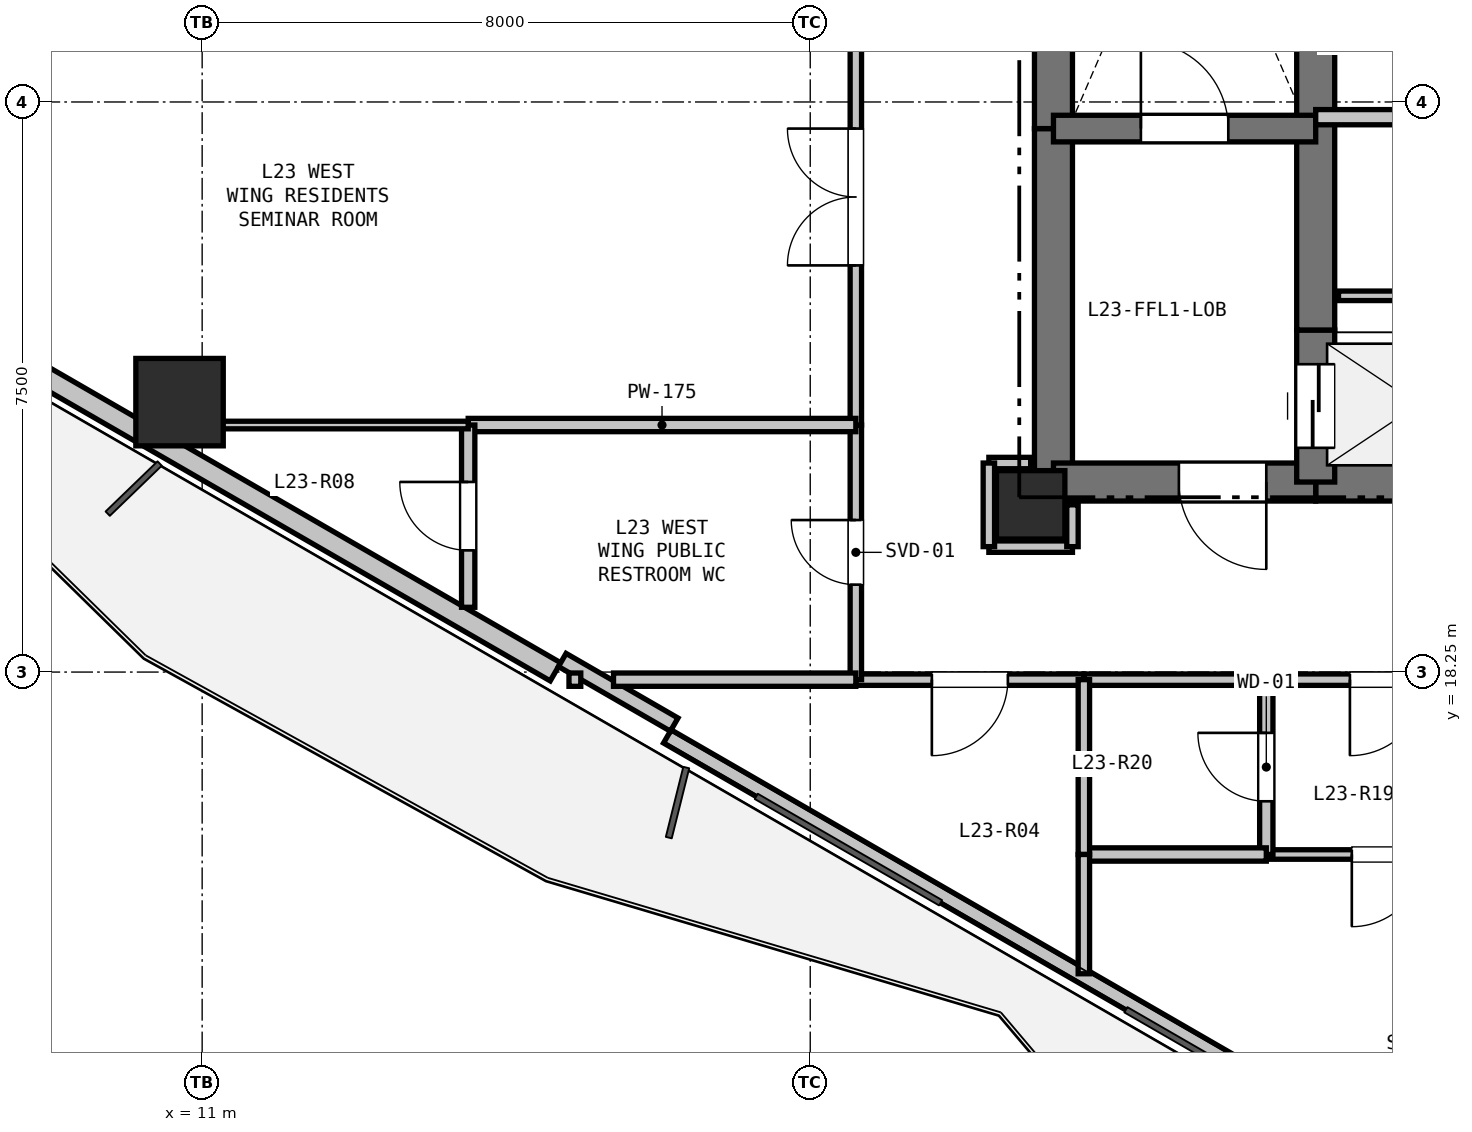
"""IFC4 building model, lengths in metres.
Left out: names, types, materials, properties, quantities, classifications, styles, units other than length and angle.
Written with IfcOpenShell. Run it as: python <this file> out.ifc"""

import sys

from ifc_helpers import new_model, si_unit, direction, frame, frame_2d, origin, origin_2d, place, context, subcontext, project, spatial, rectangle, hollow_rectangle, extrude, element, fill, save


model = new_model("IFC4")
c1 = context("Model", 3, precision=1e-05, world=origin(), true_north=direction((0.0, 1.0)))
c2 = subcontext(c1, "Body", "Model", "MODEL_VIEW")
j1 = project(units=[si_unit("LENGTHUNIT", "METRE"), si_unit("PLANEANGLEUNIT", "RADIAN")], contexts=[c1])
p1 = place(None, origin())
s1 = spatial("IfcSite", under=j1, at=p1, CompositionType="ELEMENT")
p2 = place(p1, origin())
s2 = spatial("IfcBuilding", under=s1, at=p2, CompositionType="ELEMENT")
p3 = place(p2, frame((0.0, 0.0, 86.7)))
s3 = spatial("IfcBuildingStorey", under=s2, at=p3, CompositionType="ELEMENT", Elevation=86.7)
p4 = place(p3, frame((21.9, 20.45, 0.0), z_axis=(0.0, 0.0, 1.0), x_axis=(1.0, 0.0, 0.0)))
e1 = element("IfcColumn", 1, at=p4, inside=s3, PredefinedType="COLUMN", context=c2, shape_type="SweptSolid", body=[
    extrude(rectangle(XDim=0.9, YDim=0.9, at=origin_2d()), origin(), (0.0, 0.0, 1.0), 3.3),
])
p5 = place(p3, frame((10.702, 21.801, 0.0), z_axis=(0.0, 0.0, 1.0), x_axis=(1.0, 0.0, 0.0)))
e2 = element("IfcColumn", 2, at=p5, inside=s3, PredefinedType="COLUMN", context=c2, shape_type="SweptSolid", body=[
    extrude(hollow_rectangle(XDim=1.15, YDim=1.15, WallThickness=0.032, at=origin_2d()), origin(), (0.0, 0.0, 1.0), 3.3),
])
p6 = place(p3, frame((26.845, 11.788, 0.0), z_axis=(0.0, 0.0, 1.0), x_axis=(-0.866027010039, 0.499997217876, 0.0)))
e3 = element("IfcWall", 3, at=p6, inside=s3, PredefinedType="PARAPET", context=c2, shape_type="SweptSolid", body=[
    extrude(rectangle(XDim=11.229, YDim=0.2, at=frame_2d((5.615, 0.0))), origin(), (0.0, 0.0, 1.0), 0.2),
])
p7 = place(p3, frame((15.648, 18.253, 0.0), z_axis=(0.0, 0.0, 1.0), x_axis=(-0.866023023012, 0.500004123596, 0.0)))
e4 = element("IfcWall", 4, at=p7, inside=s3, PredefinedType="SOLIDWALL", context=c2, shape_type="SweptSolid", body=[
    extrude(rectangle(XDim=11.93, YDim=0.275, at=frame_2d((5.965, 0.0))), origin(), (0.0, 0.0, 1.0), 2.67),
])
p8 = place(p7, frame((7.725, 0.0, 0.9)))
e5 = element("IfcOpeningElement", 5, at=p8, cuts=e4, PredefinedType="OPENING", context=c2, shape_type="SweptSolid", body=[
    extrude(rectangle(XDim=1.2, YDim=1.5, at=frame_2d((0.6, 0.75))), frame((0.0, 0.147, 0.0), z_axis=(0.0, -1.0, 0.0), x_axis=(1.0, 0.0, 0.0)), (0.0, 0.0, 1.0), 0.295),
])
p9 = place(p3, frame((17.21, 17.559, 0.0), z_axis=(0.0, 0.0, 1.0), x_axis=(-0.866025371046, 0.500000056704, 0.0)))
e6 = element("IfcWall", 6, at=p9, inside=s3, PredefinedType="PARAPET", context=c2, shape_type="SweptSolid", body=[
    extrude(rectangle(XDim=1.7, YDim=0.2, at=frame_2d((0.85, 0.0))), origin(), (0.0, 0.0, 1.0), 2.67),
])
p10 = place(p3, frame((22.2, 20.75, 0.0), z_axis=(0.0, 0.0, 1.0), x_axis=(0.0, 1.0, 0.0)))
e7 = element("IfcWall", 7, at=p10, inside=s3, PredefinedType="SHEAR", context=c2, shape_type="SweptSolid", body=[
    extrude(rectangle(XDim=4.65, YDim=0.5, at=frame_2d((2.325, 0.0))), origin(), (0.0, 0.0, 1.0), 3.05),
])
p11 = place(p3, frame((22.2, 25.4, 0.0), z_axis=(0.0, 0.0, 1.0), x_axis=(0.0, 1.0, 0.0)))
e8 = element("IfcWall", 8, at=p11, inside=s3, PredefinedType="SHEAR", context=c2, shape_type="SweptSolid", body=[
    extrude(rectangle(XDim=7.35, YDim=0.5, at=frame_2d((3.675, 0.0))), origin(), (0.0, 0.0, 1.0), 3.05),
])
p12 = place(p3, frame((28.35, 20.75, 0.0), z_axis=(0.0, 0.0, 1.0), x_axis=(-1.0, 0.0, 0.0)))
e9 = element("IfcWall", 9, at=p12, inside=s3, PredefinedType="SHEAR", context=c2, shape_type="SweptSolid", body=[
    extrude(rectangle(XDim=2.7, YDim=0.5, at=frame_2d((1.35, 0.0))), origin(), (0.0, 0.0, 1.0), 3.05),
])
p13 = place(p3, frame((25.65, 20.75, 0.0), z_axis=(0.0, 0.0, 1.0), x_axis=(-1.0, 0.0, 0.0)))
e10 = element("IfcWall", 10, at=p13, inside=s3, PredefinedType="SHEAR", context=c2, shape_type="SweptSolid", body=[
    extrude(rectangle(XDim=3.45, YDim=0.5, at=frame_2d((1.725, 0.0))), origin(), (0.0, 0.0, 1.0), 3.05),
])
p14 = place(p13, frame((0.65, 0.0, 0.0)))
e11 = element("IfcOpeningElement", 11, at=p14, cuts=e10, PredefinedType="OPENING", context=c2, shape_type="SweptSolid", body=[
    extrude(rectangle(XDim=1.15, YDim=2.15, at=frame_2d((0.575, 1.075))), frame((0.0, 0.26, 0.0), z_axis=(0.0, -1.0, 0.0), x_axis=(1.0, 0.0, 0.0)), (0.0, 0.0, 1.0), 0.52),
])
p15 = place(p3, frame((25.65, 20.75, 0.0), z_axis=(0.0, 0.0, 1.0), x_axis=(0.0, 1.0, 0.0)))
e12 = element("IfcWall", 12, at=p15, inside=s3, PredefinedType="SHEAR", context=c2, shape_type="SweptSolid", body=[
    extrude(rectangle(XDim=2.0, YDim=0.5, at=frame_2d((1.0, 0.0))), origin(), (0.0, 0.0, 1.0), 3.05),
])
p16 = place(p15, frame((0.45, 0.0, 0.0)))
e13 = element("IfcOpeningElement", 13, at=p16, cuts=e12, PredefinedType="OPENING", context=c2, shape_type="SweptSolid", body=[
    extrude(rectangle(XDim=1.1, YDim=2.15, at=frame_2d((0.55, 1.075))), frame((0.0, 0.26, 0.0), z_axis=(0.0, -1.0, 0.0), x_axis=(1.0, 0.0, 0.0)), (0.0, 0.0, 1.0), 0.52),
])
p17 = place(p3, frame((25.65, 22.75, 0.0), z_axis=(0.0, 0.0, 1.0), x_axis=(0.0, 1.0, 0.0)))
e14 = element("IfcWall", 14, at=p17, inside=s3, PredefinedType="SHEAR", context=c2, shape_type="SweptSolid", body=[
    extrude(rectangle(XDim=2.8, YDim=0.5, at=frame_2d((1.4, 0.0))), origin(), (0.0, 0.0, 1.0), 3.05),
])
p18 = place(p3, frame((25.65, 25.55, 0.0), z_axis=(0.0, 0.0, 1.0), x_axis=(0.0, 1.0, 0.0)))
e15 = element("IfcWall", 15, at=p18, inside=s3, PredefinedType="SHEAR", context=c2, shape_type="SweptSolid", body=[
    extrude(rectangle(XDim=2.4, YDim=0.5, at=frame_2d((1.2, 0.0))), origin(), (0.0, 0.0, 1.0), 3.05),
])
p19 = place(p3, frame((22.2, 25.4, 0.0), z_axis=(0.0, 0.0, 1.0), x_axis=(1.0, 0.0, 0.0)))
e16 = element("IfcWall", 16, at=p19, inside=s3, PredefinedType="SHEAR", context=c2, shape_type="SweptSolid", body=[
    extrude(rectangle(XDim=3.45, YDim=0.35, at=frame_2d((1.725, 0.0))), origin(), (0.0, 0.0, 1.0), 3.05),
])
p20 = place(p19, frame((1.15, 0.0, 0.0)))
e17 = element("IfcOpeningElement", 17, at=p20, cuts=e16, PredefinedType="OPENING", context=c2, shape_type="SweptSolid", body=[
    extrude(rectangle(XDim=1.15, YDim=2.15, at=frame_2d((0.575, 1.075))), frame((0.0, 0.185, 0.0), z_axis=(0.0, -1.0, 0.0), x_axis=(1.0, 0.0, 0.0)), (0.0, 0.0, 1.0), 0.37),
])
p21 = place(p3, frame((25.65, 25.55, 0.0), z_axis=(0.0, 0.0, 1.0), x_axis=(1.0, 0.0, 0.0)))
e18 = element("IfcWall", 18, at=p21, inside=s3, PredefinedType="PARTITIONING", context=c2, shape_type="SweptSolid", body=[
    extrude(rectangle(XDim=4.95, YDim=0.2, at=frame_2d((2.475, 0.0))), origin(), (0.0, 0.0, 1.0), 3.05),
])
p22 = place(p3, frame((25.95, 23.2, 0.0), z_axis=(0.0, 0.0, 1.0), x_axis=(1.0, 0.0, 0.0)))
e19 = element("IfcWall", 19, at=p22, inside=s3, PredefinedType="PARTITIONING", context=c2, shape_type="SweptSolid", body=[
    extrude(rectangle(XDim=1.35, YDim=0.125, at=frame_2d((0.675, 0.0))), origin(), (0.0, 0.0, 1.0), 3.05),
])
p23 = place(p3, frame((21.35, 19.9, 0.0), z_axis=(0.0, 0.0, 1.0), x_axis=(1.0, 0.0, 0.0)))
e20 = element("IfcWall", 20, at=p23, inside=s3, PredefinedType="PARTITIONING", context=c2, shape_type="SweptSolid", body=[
    extrude(rectangle(XDim=1.1, YDim=0.15, at=frame_2d((0.55, 0.0))), origin(), (0.0, 0.0, 1.0), 2.423),
])
p24 = place(p3, frame((22.45, 19.9, 0.0), z_axis=(0.0, 0.0, 1.0), x_axis=(0.0, 1.0, 0.0)))
e21 = element("IfcWall", 21, at=p24, inside=s3, PredefinedType="PARTITIONING", context=c2, shape_type="SweptSolid", body=[
    extrude(rectangle(XDim=0.55, YDim=0.15, at=frame_2d((0.275, 0.0))), origin(), (0.0, 0.0, 1.0), 2.423),
])
p25 = place(p3, frame((28.2, 18.15, 0.0), z_axis=(0.0, 0.0, 1.0), x_axis=(-1.0, 0.0, 0.0)))
e22 = element("IfcWall", 22, at=p25, inside=s3, PredefinedType="PARTITIONING", context=c2, shape_type="SweptSolid", body=[
    extrude(rectangle(XDim=3.2, YDim=0.15, at=frame_2d((1.6, 0.0))), origin(), (0.0, 0.0, 1.0), 3.05),
])
p26 = place(p25, frame((1.1, 0.0, 0.0)))
e23 = element("IfcOpeningElement", 23, at=p26, cuts=e22, PredefinedType="OPENING", context=c2, shape_type="SweptSolid", body=[
    extrude(rectangle(XDim=1.0, YDim=2.15, at=frame_2d((0.5, 1.075))), frame((0.0, 0.085, 0.0), z_axis=(0.0, -1.0, 0.0), x_axis=(1.0, 0.0, 0.0)), (0.0, 0.0, 1.0), 0.17),
])
p27 = place(p3, frame((25.0, 18.15, 0.0), z_axis=(0.0, 0.0, 1.0), x_axis=(-1.0, 0.0, 0.0)))
e24 = element("IfcWall", 24, at=p27, inside=s3, PredefinedType="PARTITIONING", context=c2, shape_type="SweptSolid", body=[
    extrude(rectangle(XDim=2.4, YDim=0.15, at=frame_2d((1.2, 0.0))), origin(), (0.0, 0.0, 1.0), 2.423),
])
p28 = place(p3, frame((22.6, 18.15, 0.0), z_axis=(0.0, 0.0, 1.0), x_axis=(-1.0, 0.0, 0.0)))
e25 = element("IfcWall", 25, at=p28, inside=s3, PredefinedType="PARTITIONING", context=c2, shape_type="SweptSolid", body=[
    extrude(rectangle(XDim=3.0, YDim=0.15, at=frame_2d((1.5, 0.0))), origin(), (0.0, 0.0, 1.0), 3.05),
])
p29 = place(p28, frame((1.0, 0.0, 0.0)))
e26 = element("IfcOpeningElement", 26, at=p29, cuts=e25, PredefinedType="OPENING", context=c2, shape_type="SweptSolid", body=[
    extrude(rectangle(XDim=1.0, YDim=2.15, at=frame_2d((0.5, 1.075))), frame((0.0, 0.085, 0.0), z_axis=(0.0, -1.0, 0.0), x_axis=(1.0, 0.0, 0.0)), (0.0, 0.0, 1.0), 0.17),
])
p30 = place(p3, frame((19.6, 18.15, 0.0), z_axis=(0.0, 0.0, 1.0), x_axis=(0.0, 1.0, 0.0)))
e27 = element("IfcWall", 27, at=p30, inside=s3, PredefinedType="PARTITIONING", context=c2, shape_type="SweptSolid", body=[
    extrude(rectangle(XDim=3.35, YDim=0.15, at=frame_2d((1.675, 0.0))), origin(), (0.0, 0.0, 1.0), 2.423),
])
p31 = place(p30, frame((1.25, 0.0, 0.0)))
e28 = element("IfcOpeningElement", 28, at=p31, cuts=e27, PredefinedType="OPENING", context=c2, shape_type="SweptSolid", body=[
    extrude(rectangle(XDim=0.85, YDim=2.1, at=frame_2d((0.425, 1.05))), frame((0.0, 0.085, 0.0), z_axis=(0.0, -1.0, 0.0), x_axis=(1.0, 0.0, 0.0)), (0.0, 0.0, 1.0), 0.17),
])
p32 = place(p3, frame((19.6, 21.5, 0.0), z_axis=(0.0, 0.0, 1.0), x_axis=(0.0, 1.0, 0.0)))
e29 = element("IfcWall", 29, at=p32, inside=s3, PredefinedType="PARTITIONING", context=c2, shape_type="SweptSolid", body=[
    extrude(rectangle(XDim=6.0, YDim=0.15, at=frame_2d((3.0, 0.0))), origin(), (0.0, 0.0, 1.0), 3.05),
])
p33 = place(p32, frame((2.1, 0.0, 0.0)))
e30 = element("IfcOpeningElement", 30, at=p33, cuts=e29, PredefinedType="OPENING", context=c2, shape_type="SweptSolid", body=[
    extrude(rectangle(XDim=1.8, YDim=2.2, at=frame_2d((0.9, 1.1))), frame((0.0, 0.085, 0.0), z_axis=(0.0, -1.0, 0.0), x_axis=(1.0, 0.0, 0.0)), (0.0, 0.0, 1.0), 0.17),
])
p34 = place(p3, frame((21.9, 21.0, 0.0), z_axis=(0.0, 0.0, 1.0), x_axis=(-1.0, 0.0, 0.0)))
e31 = element("IfcWall", 31, at=p34, inside=s3, PredefinedType="PARTITIONING", context=c2, shape_type="SweptSolid", body=[
    extrude(rectangle(XDim=0.55, YDim=0.15, at=frame_2d((0.275, 0.0))), origin(), (0.0, 0.0, 1.0), 2.498),
])
p35 = place(p3, frame((21.35, 21.0, 0.0), z_axis=(0.0, 0.0, 1.0), x_axis=(0.0, -1.0, 0.0)))
e32 = element("IfcWall", 32, at=p35, inside=s3, PredefinedType="PARTITIONING", context=c2, shape_type="SweptSolid", body=[
    extrude(rectangle(XDim=1.1, YDim=0.15, at=frame_2d((0.55, 0.0))), origin(), (0.0, 0.0, 1.0), 2.423),
])
p36 = place(p3, frame((28.2, 15.85, 0.0), z_axis=(0.0, 0.0, 1.0), x_axis=(-1.0, 0.0, 0.0)))
e33 = element("IfcWall", 33, at=p36, inside=s3, PredefinedType="PARTITIONING", context=c2, shape_type="SweptSolid", body=[
    extrude(rectangle(XDim=3.2, YDim=0.125, at=frame_2d((1.6, 0.0))), origin(), (0.0, 0.0, 1.0), 2.423),
])
p37 = place(p36, frame((1.125, 0.0, 0.0)))
e34 = element("IfcOpeningElement", 34, at=p37, cuts=e33, PredefinedType="OPENING", context=c2, shape_type="SweptSolid", body=[
    extrude(rectangle(XDim=0.95, YDim=2.1, at=frame_2d((0.475, 1.05))), frame((0.0, 0.073, 0.0), z_axis=(0.0, -1.0, 0.0), x_axis=(1.0, 0.0, 0.0)), (0.0, 0.0, 1.0), 0.145),
])
p38 = place(p3, frame((25.0, 15.85, 0.0), z_axis=(0.0, 0.0, 1.0), x_axis=(0.0, 1.0, 0.0)))
e35 = element("IfcWall", 35, at=p38, inside=s3, PredefinedType="PLUMBINGWALL", context=c2, shape_type="SweptSolid", body=[
    extrude(rectangle(XDim=2.3, YDim=0.175, at=frame_2d((1.15, 0.0))), origin(), (0.0, 0.0, 1.0), 2.423),
])
p39 = place(p38, frame((0.7, 0.0, 0.0)))
e36 = element("IfcOpeningElement", 36, at=p39, cuts=e35, PredefinedType="OPENING", context=c2, shape_type="SweptSolid", body=[
    extrude(rectangle(XDim=0.9, YDim=2.1, at=frame_2d((0.45, 1.05))), frame((0.0, 0.097, 0.0), z_axis=(0.0, -1.0, 0.0), x_axis=(1.0, 0.0, 0.0)), (0.0, 0.0, 1.0), 0.195),
])
p40 = place(p3, frame((14.5, 21.5, 0.0), z_axis=(0.0, 0.0, 1.0), x_axis=(1.0, 0.0, 0.0)))
e37 = element("IfcWall", 37, at=p40, inside=s3, PredefinedType="PLUMBINGWALL", context=c2, shape_type="SweptSolid", body=[
    extrude(rectangle(XDim=5.1, YDim=0.175, at=frame_2d((2.55, 0.0))), origin(), (0.0, 0.0, 1.0), 2.423),
])
p41 = place(p3, frame((19.6, 18.15, 0.0), z_axis=(0.0, 0.0, 1.0), x_axis=(-1.0, 0.0, 0.0)))
e38 = element("IfcWall", 38, at=p41, inside=s3, PredefinedType="PLUMBINGWALL", context=c2, shape_type="SweptSolid", body=[
    extrude(rectangle(XDim=3.188, YDim=0.175, at=frame_2d((1.594, 0.0))), origin(), (0.0, 0.0, 1.0), 2.365),
])
p42 = place(p3, frame((15.981, 18.15, 0.0), z_axis=(0.0, 0.0, 1.0), x_axis=(-1.0, 0.0, 0.0)))
e39 = element("IfcWall", 39, at=p42, inside=s3, PredefinedType="PLUMBINGWALL", context=c2, shape_type="SweptSolid", body=[
    extrude(rectangle(XDim=0.155, YDim=0.175, at=frame_2d((0.078, 0.0))), origin(), (0.0, 0.0, 1.0), 3.05),
])
p43 = place(p3, frame((14.5, 19.102, 0.0), z_axis=(0.0, 0.0, 1.0), x_axis=(0.0, 1.0, 0.0)))
e40 = element("IfcWall", 40, at=p43, inside=s3, PredefinedType="PLUMBINGWALL", context=c2, shape_type="SweptSolid", body=[
    extrude(rectangle(XDim=2.398, YDim=0.175, at=frame_2d((1.199, 0.0))), origin(), (0.0, 0.0, 1.0), 2.365),
])
p44 = place(p43, frame((0.749, 0.0, 0.0)))
e41 = element("IfcOpeningElement", 41, at=p44, cuts=e40, PredefinedType="OPENING", context=c2, shape_type="SweptSolid", body=[
    extrude(rectangle(XDim=0.9, YDim=2.1, at=frame_2d((0.45, 1.05))), frame((0.0, 0.097, 0.0), z_axis=(0.0, -1.0, 0.0), x_axis=(1.0, 0.0, 0.0)), (0.0, 0.0, 1.0), 0.195),
])
p45 = place(p3, frame((25.0, 15.85, 0.0), z_axis=(0.0, 0.0, 1.0), x_axis=(-1.0, 0.0, 0.0)))
e42 = element("IfcWall", 42, at=p45, inside=s3, PredefinedType="PLUMBINGWALL", context=c2, shape_type="SweptSolid", body=[
    extrude(rectangle(XDim=2.4, YDim=0.175, at=frame_2d((1.2, 0.0))), origin(), (0.0, 0.0, 1.0), 3.05),
])
p46 = place(p3, frame((22.6, 15.85, 0.0), z_axis=(0.0, 0.0, 1.0), x_axis=(0.0, 1.0, 0.0)))
e43 = element("IfcWall", 43, at=p46, inside=s3, PredefinedType="PARTITIONING", context=c2, shape_type="SweptSolid", body=[
    extrude(rectangle(XDim=2.3, YDim=0.15, at=frame_2d((1.15, 0.0))), origin(), (0.0, 0.0, 1.0), 3.05),
])
p47 = place(p3, frame((22.6, 15.85, 0.0), z_axis=(0.0, 0.0, 1.0), x_axis=(0.0, -1.0, 0.0)))
e44 = element("IfcWall", 44, at=p47, inside=s3, PredefinedType="PARTITIONING", context=c2, shape_type="SweptSolid", body=[
    extrude(rectangle(XDim=1.569, YDim=0.15, at=frame_2d((0.785, 0.0))), origin(), (0.0, 0.0, 1.0), 2.365),
])
p48 = place(p3, frame((14.5, 21.5, 0.0), z_axis=(0.0, 0.0, 1.0), x_axis=(-1.0, 0.0, 0.0)))
e45 = element("IfcWall", 45, at=p48, inside=s3, PredefinedType="PARTITIONING", context=c2, shape_type="SweptSolid", body=[
    extrude(rectangle(XDim=4.182, YDim=0.1, at=frame_2d((2.091, 0.0))), origin(), (0.0, 0.0, 1.0), 2.365),
])
p49 = place(p16, origin())
e46 = element("IfcDoor", 46, at=p49, inside=s3, OperationType="SLIDING_TO_LEFT", PredefinedType="DOOR", context=c2, shape_type="SweptSolid", body=[
    extrude(rectangle(XDim=1.1, YDim=2.15, at=frame_2d((0.55, 1.075))), frame((0.0, 0.025, 0.0), z_axis=(0.0, -1.0, 0.0), x_axis=(1.0, 0.0, 0.0)), (0.0, 0.0, 1.0), 0.05),
])
fill(e13, e46)
p50 = place(p20, origin())
e47 = element("IfcDoor", 47, at=p50, inside=s3, OperationType="SINGLE_SWING_LEFT", PredefinedType="DOOR", context=c2, shape_type="SweptSolid", body=[
    extrude(rectangle(XDim=1.15, YDim=2.15, at=frame_2d((0.575, 1.075))), frame((0.0, 0.025, 0.0), z_axis=(0.0, -1.0, 0.0), x_axis=(1.0, 0.0, 0.0)), (0.0, 0.0, 1.0), 0.05),
])
fill(e17, e47)
p51 = place(p14, origin())
e48 = element("IfcDoor", 48, at=p51, inside=s3, OperationType="SINGLE_SWING_LEFT", PredefinedType="DOOR", context=c2, shape_type="SweptSolid", body=[
    extrude(rectangle(XDim=1.15, YDim=2.15, at=frame_2d((0.575, 1.075))), frame((0.0, 0.025, 0.0), z_axis=(0.0, -1.0, 0.0), x_axis=(1.0, 0.0, 0.0)), (0.0, 0.0, 1.0), 0.05),
])
fill(e11, e48)
p52 = place(p26, origin())
e49 = element("IfcDoor", 49, at=p52, inside=s3, OperationType="SINGLE_SWING_RIGHT", PredefinedType="DOOR", context=c2, shape_type="SweptSolid", body=[
    extrude(rectangle(XDim=1.0, YDim=2.15, at=frame_2d((0.5, 1.075))), frame((0.0, 0.025, 0.0), z_axis=(0.0, -1.0, 0.0), x_axis=(1.0, 0.0, 0.0)), (0.0, 0.0, 1.0), 0.05),
])
fill(e23, e49)
p53 = place(p31, origin())
e50 = element("IfcDoor", 50, at=p53, inside=s3, OperationType="SINGLE_SWING_RIGHT", PredefinedType="DOOR", context=c2, shape_type="SweptSolid", body=[
    extrude(rectangle(XDim=0.85, YDim=2.1, at=frame_2d((0.425, 1.05))), frame((0.0, 0.025, 0.0), z_axis=(0.0, -1.0, 0.0), x_axis=(1.0, 0.0, 0.0)), (0.0, 0.0, 1.0), 0.05),
])
fill(e28, e50)
p54 = place(p29, origin())
e51 = element("IfcDoor", 51, at=p54, inside=s3, OperationType="SINGLE_SWING_RIGHT", PredefinedType="DOOR", context=c2, shape_type="SweptSolid", body=[
    extrude(rectangle(XDim=1.0, YDim=2.15, at=frame_2d((0.5, 1.075))), frame((0.0, 0.025, 0.0), z_axis=(0.0, -1.0, 0.0), x_axis=(1.0, 0.0, 0.0)), (0.0, 0.0, 1.0), 0.05),
])
fill(e26, e51)
p55 = place(p33, origin())
e52 = element("IfcDoor", 52, at=p55, inside=s3, OperationType="DOUBLE_DOOR_SINGLE_SWING", PredefinedType="DOOR", context=c2, shape_type="SweptSolid", body=[
    extrude(rectangle(XDim=1.8, YDim=2.2, at=frame_2d((0.9, 1.1))), frame((0.0, 0.025, 0.0), z_axis=(0.0, -1.0, 0.0), x_axis=(1.0, 0.0, 0.0)), (0.0, 0.0, 1.0), 0.05),
])
fill(e30, e52)
p56 = place(p39, origin())
e53 = element("IfcDoor", 53, at=p56, inside=s3, OperationType="SINGLE_SWING_RIGHT", PredefinedType="DOOR", context=c2, shape_type="SweptSolid", body=[
    extrude(rectangle(XDim=0.9, YDim=2.1, at=frame_2d((0.45, 1.05))), frame((0.0, 0.025, 0.0), z_axis=(0.0, -1.0, 0.0), x_axis=(1.0, 0.0, 0.0)), (0.0, 0.0, 1.0), 0.05),
])
fill(e36, e53)
p57 = place(p37, origin())
e54 = element("IfcDoor", 54, at=p57, inside=s3, OperationType="SINGLE_SWING_RIGHT", PredefinedType="DOOR", context=c2, shape_type="SweptSolid", body=[
    extrude(rectangle(XDim=0.95, YDim=2.1, at=frame_2d((0.475, 1.05))), frame((0.0, 0.025, 0.0), z_axis=(0.0, -1.0, 0.0), x_axis=(1.0, 0.0, 0.0)), (0.0, 0.0, 1.0), 0.05),
])
fill(e34, e54)
p58 = place(p44, origin())
e55 = element("IfcDoor", 55, at=p58, inside=s3, OperationType="SINGLE_SWING_RIGHT", PredefinedType="DOOR", context=c2, shape_type="SweptSolid", body=[
    extrude(rectangle(XDim=0.9, YDim=2.1, at=frame_2d((0.45, 1.05))), frame((0.0, 0.025, 0.0), z_axis=(0.0, -1.0, 0.0), x_axis=(1.0, 0.0, 0.0)), (0.0, 0.0, 1.0), 0.05),
])
fill(e41, e55)
save(model, sys.argv[1])
